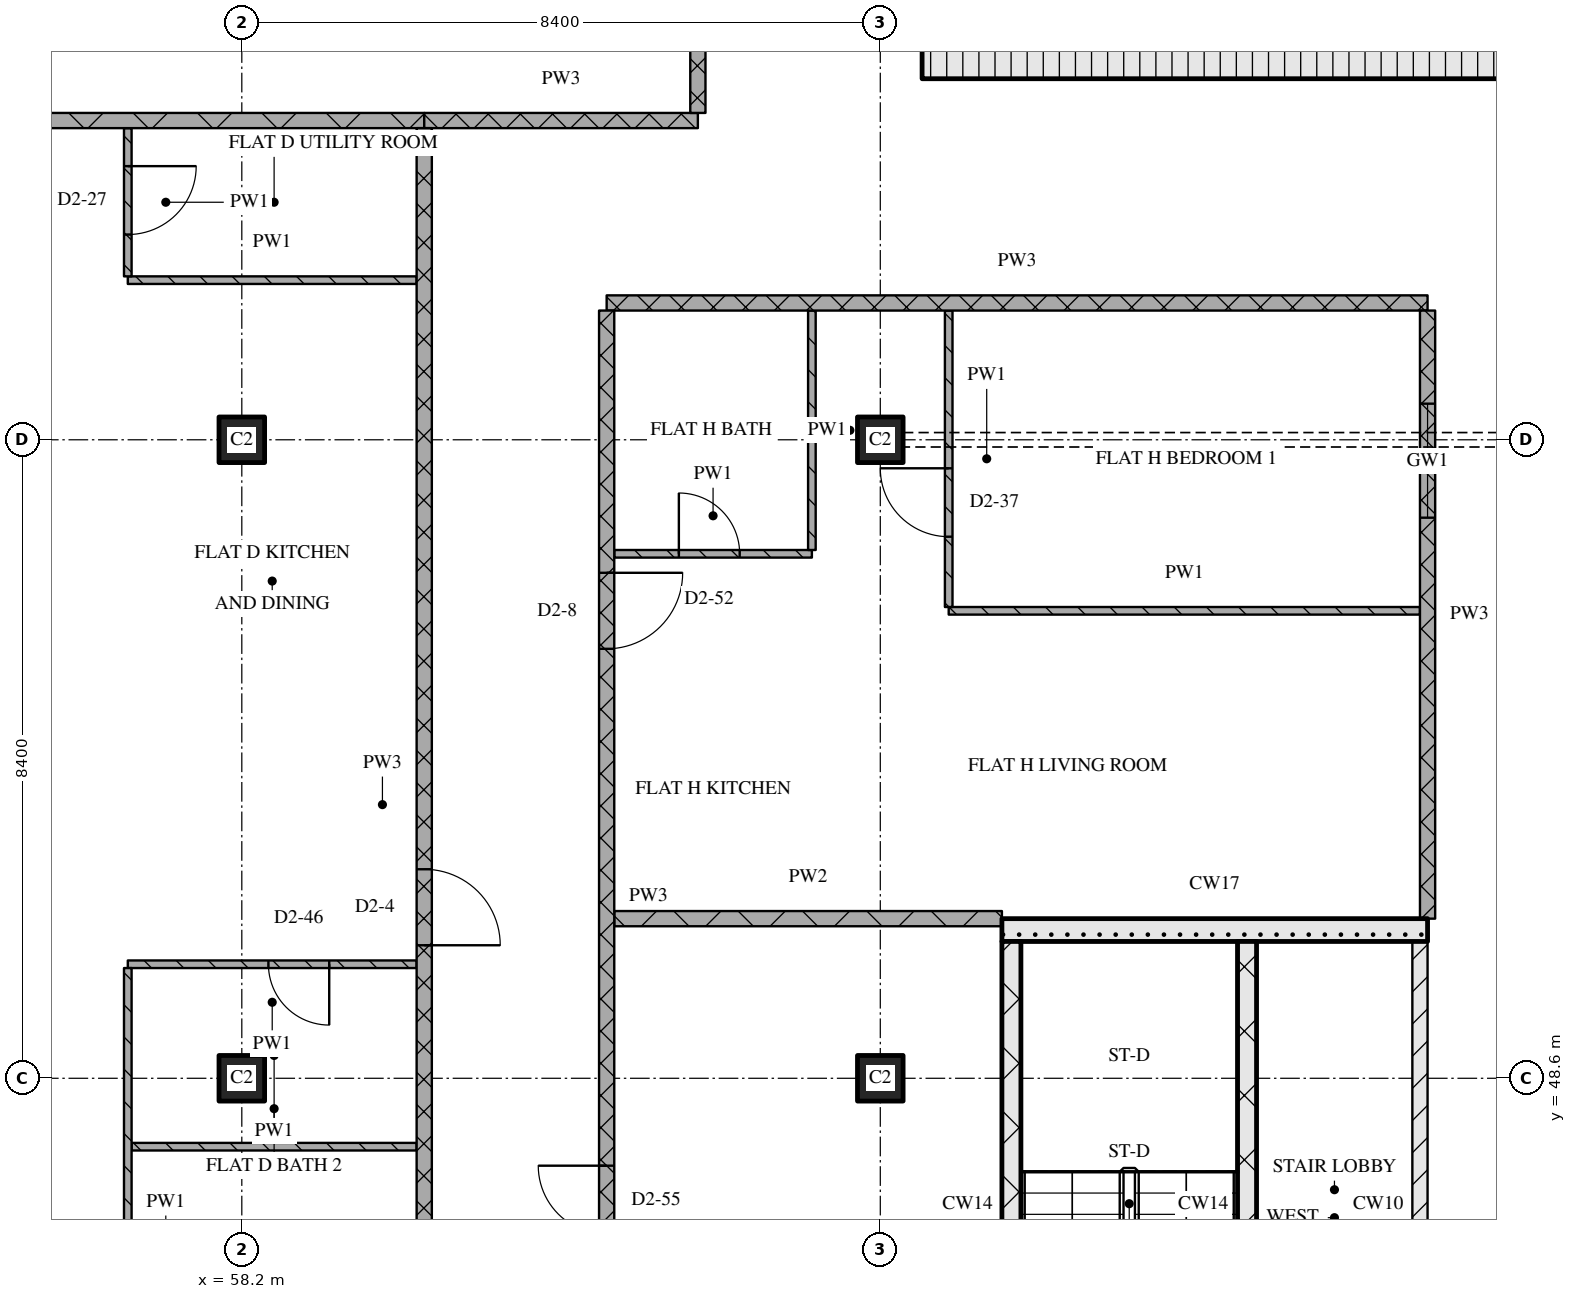
"""IFC4 building model, lengths in metres.
Left out: names, types, materials, properties, quantities, classifications, styles, units other than length and angle.
Written with IfcOpenShell. Run it as: python <this file> out.ifc"""

import sys

from ifc_helpers import new_model, si_unit, direction, frame, frame_2d, origin, origin_2d, place, context, subcontext, project, spatial, rectangle, extrude, element, fill, save


model = new_model("IFC4")
c1 = context("Model", 3, precision=1e-05, world=origin(), true_north=direction((0.0, 1.0)))
c2 = subcontext(c1, "Body", "Model", "MODEL_VIEW")
j1 = project(units=[si_unit("LENGTHUNIT", "METRE"), si_unit("PLANEANGLEUNIT", "RADIAN")], contexts=[c1])
p1 = place(None, origin())
s1 = spatial("IfcSite", under=j1, at=p1, CompositionType="ELEMENT")
p2 = place(p1, origin())
s2 = spatial("IfcBuilding", under=s1, at=p2, CompositionType="ELEMENT")
p3 = place(p2, frame((0.0, 0.0, 219.9)))
s3 = spatial("IfcBuildingStorey", under=s2, at=p3, CompositionType="ELEMENT", Elevation=219.9)
for number, where, z_axis, x_axis in (
    (1, (58.2, 48.6, 0.0), (0.0, 0.0, 1.0), (1.0, 0.0, 0.0)),
    (2, (58.2, 57.0, 0.0), (0.0, 0.0, 1.0), (1.0, 0.0, 0.0)),
    (3, (66.6, 48.6, 0.0), (0.0, 0.0, 1.0), (1.0, 0.0, 0.0)),
    (4, (66.6, 57.0, 0.0), (0.0, 0.0, 1.0), (1.0, 0.0, 0.0)),
):
    element("IfcColumn", number, at=place(p3, frame(where, z_axis=z_axis, x_axis=x_axis)), inside=s3, PredefinedType="COLUMN", context=c2, shape_type="SweptSolid", body=[
        extrude(rectangle(XDim=0.6, YDim=0.6, at=origin_2d()), origin(), (0.0, 0.0, 1.0), 3.6),
    ])
p4 = place(p3, frame((67.15, 62.075, 0.0), z_axis=(0.0, 0.0, 1.0), x_axis=(1.0, 0.0, 0.0)))
e5 = element("IfcWall", 5, at=p4, inside=s3, PredefinedType="SOLIDWALL", context=c2, shape_type="SweptSolid", body=[
    extrude(rectangle(XDim=40.9, YDim=0.65, at=frame_2d((20.45, 0.0))), origin(), (0.0, 0.0, 1.0), 3.32),
])
p5 = place(p4, frame((20.8, 0.0, 0.0)))
e6 = element("IfcOpeningElement", 6, at=p5, cuts=e5, PredefinedType="OPENING", context=c2, shape_type="SweptSolid", body=[
    extrude(rectangle(XDim=1.8, YDim=2.1, at=frame_2d((0.9, 1.05))), frame((0.0, 0.335, 0.0), z_axis=(0.0, -1.0, 0.0), x_axis=(1.0, 0.0, 0.0)), (0.0, 0.0, 1.0), 0.67),
])
p6 = place(p3, frame((68.325, 43.5, 0.0), z_axis=(0.0, 0.0, 1.0), x_axis=(0.0, 1.0, 0.0)))
e7 = element("IfcWall", 7, at=p6, inside=s3, PredefinedType="SOLIDWALL", context=c2, shape_type="SweptSolid", body=[
    extrude(rectangle(XDim=6.9, YDim=0.25, at=frame_2d((3.45, 0.0))), origin(), (0.0, 0.0, 1.0), 3.32),
])
p7 = place(p3, frame((71.425, 43.5, 0.0), z_axis=(0.0, 0.0, 1.0), x_axis=(0.0, 1.0, 0.0)))
e8 = element("IfcWall", 8, at=p7, inside=s3, PredefinedType="SOLIDWALL", context=c2, shape_type="SweptSolid", body=[
    extrude(rectangle(XDim=6.9, YDim=0.25, at=frame_2d((3.45, 0.0))), origin(), (0.0, 0.0, 1.0), 3.32),
])
p8 = place(p7, frame((0.2, 0.0, 0.0)))
e9 = element("IfcOpeningElement", 9, at=p8, cuts=e8, PredefinedType="OPENING", context=c2, shape_type="SweptSolid", body=[
    extrude(rectangle(XDim=1.0, YDim=2.1, at=frame_2d((0.5, 1.05))), frame((0.0, 0.135, 0.0), z_axis=(0.0, -1.0, 0.0), x_axis=(1.0, 0.0, 0.0)), (0.0, 0.0, 1.0), 0.27),
])
p9 = place(p3, frame((73.7, 43.5, 0.0), z_axis=(0.0, 0.0, 1.0), x_axis=(0.0, 1.0, 0.0)))
e10 = element("IfcWall", 10, at=p9, inside=s3, PredefinedType="PARTITIONING", context=c2, shape_type="SweptSolid", body=[
    extrude(rectangle(XDim=6.9, YDim=0.2, at=frame_2d((3.45, 0.0))), origin(), (0.0, 0.0, 1.0), 3.32),
])
p10 = place(p9, frame((1.0, 0.0, 0.0)))
e11 = element("IfcOpeningElement", 11, at=p10, cuts=e10, PredefinedType="OPENING", context=c2, shape_type="SweptSolid", body=[
    extrude(rectangle(XDim=1.0, YDim=2.1, at=frame_2d((0.5, 1.05))), frame((0.0, 0.11, 0.0), z_axis=(0.0, -1.0, 0.0), x_axis=(1.0, 0.0, 0.0)), (0.0, 0.0, 1.0), 0.22),
])
p11 = place(p3, frame((68.2, 50.55, 0.0), z_axis=(0.0, 0.0, 1.0), x_axis=(1.0, 0.0, 0.0)))
e12 = element("IfcWall", 12, at=p11, inside=s3, PredefinedType="SOLIDWALL", context=c2, shape_type="SweptSolid", body=[
    extrude(rectangle(XDim=5.6, YDim=0.3, at=frame_2d((2.8, 0.0))), origin(), (0.0, 0.0, 1.0), 3.32),
])
p12 = place(p3, frame((56.75, 47.7, 0.0), z_axis=(0.0, 0.0, 1.0), x_axis=(1.0, 0.0, 0.0)))
e13 = element("IfcWall", 13, at=p12, inside=s3, PredefinedType="PARTITIONING", context=c2, shape_type="SweptSolid", body=[
    extrude(rectangle(XDim=3.75, YDim=0.1, at=frame_2d((1.875, 0.0))), origin(), (0.0, 0.0, 1.0), 3.32),
])
p13 = place(p3, frame((60.5, 50.1, 0.0), z_axis=(0.0, 0.0, 1.0), x_axis=(-1.0, 0.0, 0.0)))
e14 = element("IfcWall", 14, at=p13, inside=s3, PredefinedType="PARTITIONING", context=c2, shape_type="SweptSolid", body=[
    extrude(rectangle(XDim=3.8, YDim=0.1, at=frame_2d((1.9, 0.0))), origin(), (0.0, 0.0, 1.0), 3.32),
])
p14 = place(p13, frame((1.15, 0.0, 0.0)))
e15 = element("IfcOpeningElement", 15, at=p14, cuts=e14, PredefinedType="OPENING", context=c2, shape_type="SweptSolid", body=[
    extrude(rectangle(XDim=0.8, YDim=2.1, at=frame_2d((0.4, 1.05))), frame((0.0, 0.06, 0.0), z_axis=(0.0, -1.0, 0.0), x_axis=(1.0, 0.0, 0.0)), (0.0, 0.0, 1.0), 0.12),
])
p15 = place(p3, frame((63.1, 50.7, 0.0), z_axis=(0.0, 0.0, 1.0), x_axis=(1.0, 0.0, 0.0)))
e16 = element("IfcWall", 16, at=p15, inside=s3, PredefinedType="PARTITIONING", context=c2, shape_type="SweptSolid", body=[
    extrude(rectangle(XDim=5.1, YDim=0.2, at=frame_2d((2.55, 0.0))), origin(), (0.0, 0.0, 1.0), 3.32),
])
p16 = place(p3, frame((67.5, 54.75, 0.0), z_axis=(0.0, 0.0, 1.0), x_axis=(1.0, 0.0, 0.0)))
e17 = element("IfcWall", 17, at=p16, inside=s3, PredefinedType="PARTITIONING", context=c2, shape_type="SweptSolid", body=[
    extrude(rectangle(XDim=6.2, YDim=0.1, at=frame_2d((3.1, 0.0))), origin(), (0.0, 0.0, 1.0), 3.32),
])
p17 = place(p3, frame((63.1, 55.5, 0.0), z_axis=(0.0, 0.0, 1.0), x_axis=(1.0, 0.0, 0.0)))
e18 = element("IfcWall", 18, at=p17, inside=s3, PredefinedType="PARTITIONING", context=c2, shape_type="SweptSolid", body=[
    extrude(rectangle(XDim=2.6, YDim=0.1, at=frame_2d((1.3, 0.0))), origin(), (0.0, 0.0, 1.0), 3.32),
])
p18 = place(p17, frame((0.85, 0.0, 0.0)))
e19 = element("IfcOpeningElement", 19, at=p18, cuts=e18, PredefinedType="OPENING", context=c2, shape_type="SweptSolid", body=[
    extrude(rectangle(XDim=0.8, YDim=2.1, at=frame_2d((0.4, 1.05))), frame((0.0, 0.06, 0.0), z_axis=(0.0, -1.0, 0.0), x_axis=(1.0, 0.0, 0.0)), (0.0, 0.0, 1.0), 0.12),
])
p19 = place(p3, frame((63.0, 58.8, 0.0), z_axis=(0.0, 0.0, 1.0), x_axis=(1.0, 0.0, 0.0)))
e20 = element("IfcWall", 20, at=p19, inside=s3, PredefinedType="PARTITIONING", context=c2, shape_type="SweptSolid", body=[
    extrude(rectangle(XDim=10.8, YDim=0.2, at=frame_2d((5.4, 0.0))), origin(), (0.0, 0.0, 1.0), 3.32),
])
p20 = place(p3, frame((56.7, 59.1, 0.0), z_axis=(0.0, 0.0, 1.0), x_axis=(1.0, 0.0, 0.0)))
e21 = element("IfcWall", 21, at=p20, inside=s3, PredefinedType="PARTITIONING", context=c2, shape_type="SweptSolid", body=[
    extrude(rectangle(XDim=3.8, YDim=0.1, at=frame_2d((1.9, 0.0))), origin(), (0.0, 0.0, 1.0), 3.32),
])
p21 = place(p3, frame((60.6, 61.2, 0.0), z_axis=(0.0, 0.0, 1.0), x_axis=(1.0, 0.0, 0.0)))
e22 = element("IfcWall", 22, at=p21, inside=s3, PredefinedType="PARTITIONING", context=c2, shape_type="SweptSolid", body=[
    extrude(rectangle(XDim=3.6, YDim=0.2, at=frame_2d((1.8, 0.0))), origin(), (0.0, 0.0, 1.0), 3.32),
])
p22 = place(p3, frame((48.28, 61.2, 0.0), z_axis=(0.0, 0.0, 1.0), x_axis=(1.0, 0.0, 0.0)))
e23 = element("IfcWall", 23, at=p22, inside=s3, PredefinedType="PARTITIONING", context=c2, shape_type="SweptSolid", body=[
    extrude(rectangle(XDim=12.32, YDim=0.2, at=frame_2d((6.16, 0.0))), origin(), (0.0, 0.0, 1.0), 3.32),
])
p23 = place(p3, frame((56.7, 50.05, 0.0), z_axis=(0.0, 0.0, 1.0), x_axis=(0.0, -1.0, 0.0)))
e24 = element("IfcWall", 24, at=p23, inside=s3, PredefinedType="PARTITIONING", context=c2, shape_type="SweptSolid", body=[
    extrude(rectangle(XDim=6.75, YDim=0.1, at=frame_2d((3.375, 0.0))), origin(), (0.0, 0.0, 1.0), 3.32),
])
p24 = place(p23, frame((4.2, 0.0, 0.0)))
e25 = element("IfcOpeningElement", 25, at=p24, cuts=e24, PredefinedType="OPENING", context=c2, shape_type="SweptSolid", body=[
    extrude(rectangle(XDim=0.8, YDim=2.1, at=frame_2d((0.4, 1.05))), frame((0.0, 0.06, 0.0), z_axis=(0.0, -1.0, 0.0), x_axis=(1.0, 0.0, 0.0)), (0.0, 0.0, 1.0), 0.12),
])
p25 = place(p3, frame((56.7, 61.1, 0.0), z_axis=(0.0, 0.0, 1.0), x_axis=(0.0, -1.0, 0.0)))
e26 = element("IfcWall", 26, at=p25, inside=s3, PredefinedType="PARTITIONING", context=c2, shape_type="SweptSolid", body=[
    extrude(rectangle(XDim=1.95, YDim=0.1, at=frame_2d((0.975, 0.0))), origin(), (0.0, 0.0, 1.0), 3.32),
])
p26 = place(p25, frame((0.5, 0.0, 0.0)))
e27 = element("IfcOpeningElement", 27, at=p26, cuts=e26, PredefinedType="OPENING", context=c2, shape_type="SweptSolid", body=[
    extrude(rectangle(XDim=0.9, YDim=2.1, at=frame_2d((0.45, 1.05))), frame((0.0, 0.06, 0.0), z_axis=(0.0, -1.0, 0.0), x_axis=(1.0, 0.0, 0.0)), (0.0, 0.0, 1.0), 0.12),
])
p27 = place(p3, frame((60.6, 43.3, 0.0), z_axis=(0.0, 0.0, 1.0), x_axis=(0.0, 1.0, 0.0)))
e28 = element("IfcWall", 28, at=p27, inside=s3, PredefinedType="PARTITIONING", context=c2, shape_type="SweptSolid", body=[
    extrude(rectangle(XDim=17.8, YDim=0.2, at=frame_2d((8.9, 0.0))), origin(), (0.0, 0.0, 1.0), 3.32),
])
p28 = place(p27, frame((7.05, 0.0, 0.0)))
e29 = element("IfcOpeningElement", 29, at=p28, cuts=e28, PredefinedType="OPENING", context=c2, shape_type="SweptSolid", body=[
    extrude(rectangle(XDim=1.0, YDim=2.1, at=frame_2d((0.5, 1.05))), frame((0.0, 0.11, 0.0), z_axis=(0.0, -1.0, 0.0), x_axis=(1.0, 0.0, 0.0)), (0.0, 0.0, 1.0), 0.22),
])
p29 = place(p3, frame((63.0, 58.7, 0.0), z_axis=(0.0, 0.0, 1.0), x_axis=(0.0, -1.0, 0.0)))
e30 = element("IfcWall", 30, at=p29, inside=s3, PredefinedType="PARTITIONING", context=c2, shape_type="SweptSolid", body=[
    extrude(rectangle(XDim=15.4, YDim=0.2, at=frame_2d((7.7, 0.0))), origin(), (0.0, 0.0, 1.0), 3.32),
])
p30 = place(p29, frame((3.45, 0.0, 0.0)))
e31 = element("IfcOpeningElement", 31, at=p30, cuts=e30, PredefinedType="OPENING", context=c2, shape_type="SweptSolid", body=[
    extrude(rectangle(XDim=1.0, YDim=2.1, at=frame_2d((0.5, 1.05))), frame((0.0, 0.11, 0.0), z_axis=(0.0, -1.0, 0.0), x_axis=(1.0, 0.0, 0.0)), (0.0, 0.0, 1.0), 0.22),
])
p31 = place(p29, frame((11.25, 0.0, 0.0)))
e32 = element("IfcOpeningElement", 32, at=p31, cuts=e30, PredefinedType="OPENING", context=c2, shape_type="SweptSolid", body=[
    extrude(rectangle(XDim=0.9, YDim=2.1, at=frame_2d((0.45, 1.05))), frame((0.0, 0.11, 0.0), z_axis=(0.0, -1.0, 0.0), x_axis=(1.0, 0.0, 0.0)), (0.0, 0.0, 1.0), 0.22),
])
p32 = place(p3, frame((64.2, 61.3, 0.0), z_axis=(0.0, 0.0, 1.0), x_axis=(0.0, 1.0, 0.0)))
e33 = element("IfcWall", 33, at=p32, inside=s3, PredefinedType="PARTITIONING", context=c2, shape_type="SweptSolid", body=[
    extrude(rectangle(XDim=14.02, YDim=0.2, at=frame_2d((7.01, 0.0))), origin(), (0.0, 0.0, 1.0), 3.32),
])
p33 = place(p32, frame((8.55, 0.0, 0.0)))
e34 = element("IfcOpeningElement", 34, at=p33, cuts=e33, PredefinedType="OPENING", context=c2, shape_type="SweptSolid", body=[
    extrude(rectangle(XDim=1.0, YDim=2.1, at=frame_2d((0.5, 1.05))), frame((0.0, 0.11, 0.0), z_axis=(0.0, -1.0, 0.0), x_axis=(1.0, 0.0, 0.0)), (0.0, 0.0, 1.0), 0.22),
])
p34 = place(p3, frame((65.7, 58.7, 0.0), z_axis=(0.0, 0.0, 1.0), x_axis=(0.0, -1.0, 0.0)))
e35 = element("IfcWall", 35, at=p34, inside=s3, PredefinedType="PARTITIONING", context=c2, shape_type="SweptSolid", body=[
    extrude(rectangle(XDim=3.15, YDim=0.1, at=frame_2d((1.575, 0.0))), origin(), (0.0, 0.0, 1.0), 3.32),
])
p35 = place(p3, frame((67.5, 58.7, 0.0), z_axis=(0.0, 0.0, 1.0), x_axis=(0.0, -1.0, 0.0)))
e36 = element("IfcWall", 36, at=p35, inside=s3, PredefinedType="PARTITIONING", context=c2, shape_type="SweptSolid", body=[
    extrude(rectangle(XDim=3.9, YDim=0.1, at=frame_2d((1.95, 0.0))), origin(), (0.0, 0.0, 1.0), 3.32),
])
p36 = place(p35, frame((2.075, 0.0, 0.0)))
e37 = element("IfcOpeningElement", 37, at=p36, cuts=e36, PredefinedType="OPENING", context=c2, shape_type="SweptSolid", body=[
    extrude(rectangle(XDim=0.9, YDim=2.1, at=frame_2d((0.45, 1.05))), frame((0.0, 0.06, 0.0), z_axis=(0.0, -1.0, 0.0), x_axis=(1.0, 0.0, 0.0)), (0.0, 0.0, 1.0), 0.12),
])
p37 = place(p3, frame((73.8, 58.7, 0.0), z_axis=(0.0, 0.0, 1.0), x_axis=(0.0, -1.0, 0.0)))
e38 = element("IfcWall", 38, at=p37, inside=s3, PredefinedType="PARTITIONING", context=c2, shape_type="SweptSolid", body=[
    extrude(rectangle(XDim=8.0, YDim=0.2, at=frame_2d((4.0, 0.0))), origin(), (0.0, 0.0, 1.0), 3.32),
])
p38 = place(p37, frame((1.225, 0.0, 0.9)))
e39 = element("IfcOpeningElement", 39, at=p38, cuts=e38, PredefinedType="OPENING", context=c2, shape_type="SweptSolid", body=[
    extrude(rectangle(XDim=1.5, YDim=1.5, at=frame_2d((0.75, 0.75))), frame((0.0, 0.11, 0.0), z_axis=(0.0, -1.0, 0.0), x_axis=(1.0, 0.0, 0.0)), (0.0, 0.0, 1.0), 0.22),
])
p39 = place(p14, origin())
e40 = element("IfcDoor", 40, at=p39, inside=s3, OperationType="SINGLE_SWING_LEFT", PredefinedType="DOOR", context=c2, shape_type="SweptSolid", body=[
    extrude(rectangle(XDim=0.8, YDim=2.1, at=frame_2d((0.4, 1.05))), frame((0.0, 0.025, 0.0), z_axis=(0.0, -1.0, 0.0), x_axis=(1.0, 0.0, 0.0)), (0.0, 0.0, 1.0), 0.05),
])
fill(e15, e40)
p40 = place(p18, origin())
e41 = element("IfcDoor", 41, at=p40, inside=s3, OperationType="SINGLE_SWING_LEFT", PredefinedType="DOOR", context=c2, shape_type="SweptSolid", body=[
    extrude(rectangle(XDim=0.8, YDim=2.1, at=frame_2d((0.4, 1.05))), frame((0.0, 0.025, 0.0), z_axis=(0.0, -1.0, 0.0), x_axis=(1.0, 0.0, 0.0)), (0.0, 0.0, 1.0), 0.05),
])
fill(e19, e41)
p41 = place(p26, origin())
e42 = element("IfcDoor", 42, at=p41, inside=s3, OperationType="SINGLE_SWING_LEFT", PredefinedType="DOOR", context=c2, shape_type="SweptSolid", body=[
    extrude(rectangle(XDim=0.9, YDim=2.1, at=frame_2d((0.45, 1.05))), frame((0.0, 0.025, 0.0), z_axis=(0.0, -1.0, 0.0), x_axis=(1.0, 0.0, 0.0)), (0.0, 0.0, 1.0), 0.05),
])
fill(e27, e42)
p42 = place(p28, origin())
e43 = element("IfcDoor", 43, at=p42, inside=s3, OperationType="SINGLE_SWING_RIGHT", PredefinedType="DOOR", context=c2, shape_type="SweptSolid", body=[
    extrude(rectangle(XDim=1.0, YDim=2.1, at=frame_2d((0.5, 1.05))), frame((0.0, 0.025, 0.0), z_axis=(0.0, -1.0, 0.0), x_axis=(1.0, 0.0, 0.0)), (0.0, 0.0, 1.0), 0.05),
])
fill(e29, e43)
p43 = place(p30, origin())
e44 = element("IfcDoor", 44, at=p43, inside=s3, OperationType="SINGLE_SWING_LEFT", PredefinedType="DOOR", context=c2, shape_type="SweptSolid", body=[
    extrude(rectangle(XDim=1.0, YDim=2.1, at=frame_2d((0.5, 1.05))), frame((0.0, 0.025, 0.0), z_axis=(0.0, -1.0, 0.0), x_axis=(1.0, 0.0, 0.0)), (0.0, 0.0, 1.0), 0.05),
])
fill(e31, e44)
p44 = place(p31, origin())
e45 = element("IfcDoor", 45, at=p44, inside=s3, OperationType="SINGLE_SWING_RIGHT", PredefinedType="DOOR", context=c2, shape_type="SweptSolid", body=[
    extrude(rectangle(XDim=0.9, YDim=2.1, at=frame_2d((0.45, 1.05))), frame((0.0, 0.025, 0.0), z_axis=(0.0, -1.0, 0.0), x_axis=(1.0, 0.0, 0.0)), (0.0, 0.0, 1.0), 0.05),
])
fill(e32, e45)
p45 = place(p36, origin())
e46 = element("IfcDoor", 46, at=p45, inside=s3, OperationType="SINGLE_SWING_RIGHT", PredefinedType="DOOR", context=c2, shape_type="SweptSolid", body=[
    extrude(rectangle(XDim=0.9, YDim=2.1, at=frame_2d((0.45, 1.05))), frame((0.0, 0.025, 0.0), z_axis=(0.0, -1.0, 0.0), x_axis=(1.0, 0.0, 0.0)), (0.0, 0.0, 1.0), 0.05),
])
fill(e37, e46)
p46 = place(p38, origin())
e47 = element("IfcWindow", 47, at=p46, inside=s3, PartitioningType="SINGLE_PANEL", PredefinedType="WINDOW", context=c2, shape_type="SweptSolid", body=[
    extrude(rectangle(XDim=1.5, YDim=1.5, at=frame_2d((0.75, 0.75))), frame((0.0, 0.03, 0.0), z_axis=(0.0, -1.0, 0.0), x_axis=(1.0, 0.0, 0.0)), (0.0, 0.0, 1.0), 0.06),
])
fill(e39, e47)
save(model, sys.argv[1])
